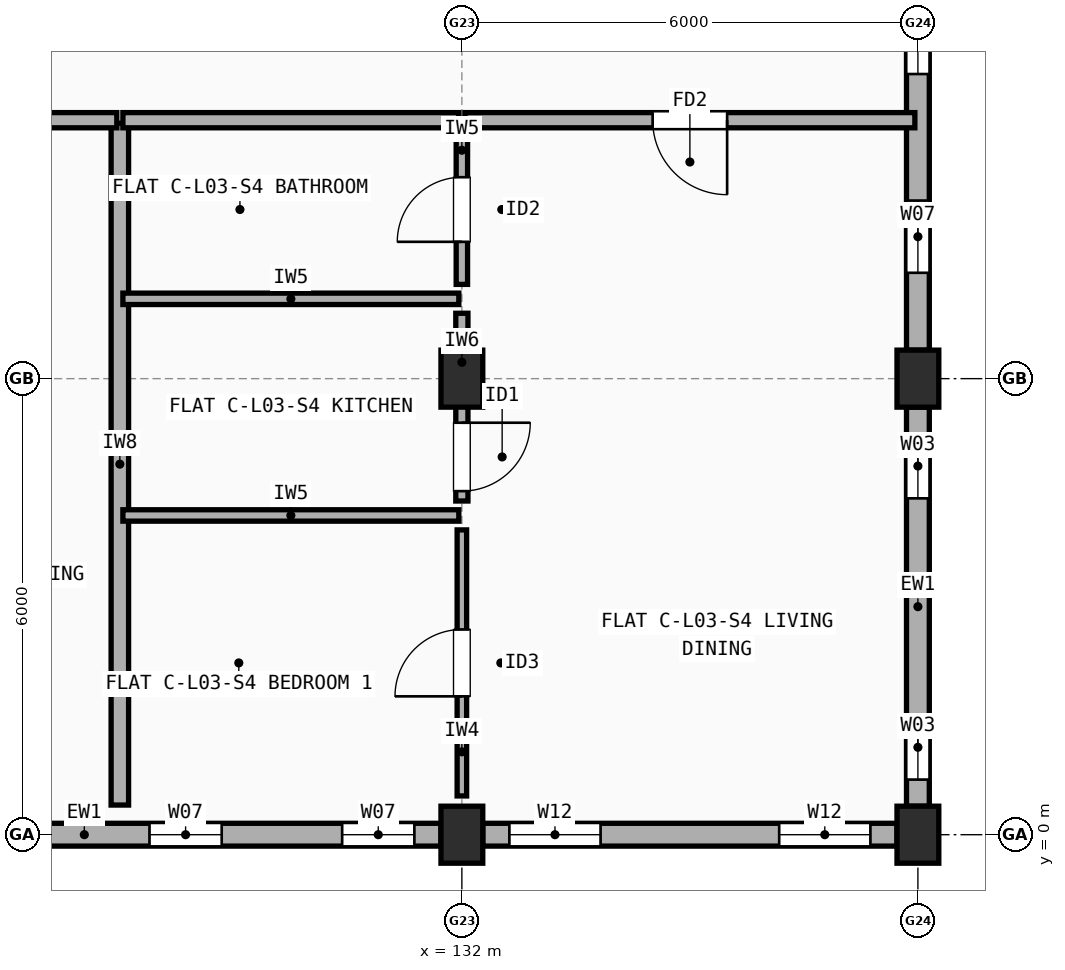
"""IFC4 building model, lengths in metres.
Left out: names, types, materials, properties, quantities, classifications, styles, units other than length and angle.
Written with IfcOpenShell. Run it as: python <this file> out.ifc"""

import sys

from ifc_helpers import new_model, si_unit, direction, frame, frame_2d, origin, origin_2d, place, context, subcontext, project, spatial, rectangle, extrude, element, fill, save


model = new_model("IFC4")
c1 = context("Model", 3, precision=1e-05, world=origin(), true_north=direction((0.0, 1.0)))
c2 = subcontext(c1, "Body", "Model", "MODEL_VIEW")
j1 = project(units=[si_unit("LENGTHUNIT", "METRE"), si_unit("PLANEANGLEUNIT", "RADIAN")], contexts=[c1])
p1 = place(None, origin())
s1 = spatial("IfcSite", under=j1, at=p1, CompositionType="ELEMENT")
p2 = place(p1, origin())
s2 = spatial("IfcBuilding", under=s1, at=p2, CompositionType="ELEMENT")
p3 = place(p2, frame((0.0, 0.0, 10.9)))
s3 = spatial("IfcBuildingStorey", under=s2, at=p3, CompositionType="ELEMENT", Elevation=10.9)
for number, where, z_axis, x_axis in (
    (1, (132.0, 0.0, 0.0), (0.0, 0.0, 1.0), (1.0, 0.0, 0.0)),
    (2, (132.0, 6.0, 0.0), (0.0, 0.0, 1.0), (1.0, 0.0, 0.0)),
    (3, (138.0, 0.0, 0.0), (0.0, 0.0, 1.0), (1.0, 0.0, 0.0)),
    (4, (138.0, 6.0, 0.0), (0.0, 0.0, 1.0), (1.0, 0.0, 0.0)),
):
    element("IfcColumn", number, at=place(p3, frame(where, z_axis=z_axis, x_axis=x_axis)), inside=s3, PredefinedType="COLUMN", context=c2, shape_type="SweptSolid", body=[
        extrude(rectangle(XDim=0.55, YDim=0.75, at=origin_2d()), origin(), (0.0, 0.0, 1.0), 2.96),
    ])
p4 = place(p3, frame((126.325, 0.0, 0.0), z_axis=(0.0, 0.0, 1.0), x_axis=(1.0, 0.0, 0.0)))
e5 = element("IfcWall", 5, at=p4, inside=s3, PredefinedType="STANDARD", context=c2, shape_type="SweptSolid", body=[
    extrude(rectangle(XDim=5.4, YDim=0.3, at=frame_2d((2.7, 0.0))), origin(), (0.0, 0.0, 1.0), 2.442),
])
p5 = place(p4, frame((1.565, 0.0, 0.9)))
e6 = element("IfcOpeningElement", 6, at=p5, cuts=e5, PredefinedType="OPENING", context=c2, shape_type="SweptSolid", body=[
    extrude(rectangle(XDim=0.95, YDim=1.35, at=frame_2d((0.475, 0.675))), frame((0.0, 0.16, 0.0), z_axis=(0.0, -1.0, 0.0), x_axis=(1.0, 0.0, 0.0)), (0.0, 0.0, 1.0), 0.32),
])
p6 = place(p4, frame((4.1, 0.0, 0.9)))
e7 = element("IfcOpeningElement", 7, at=p6, cuts=e5, PredefinedType="OPENING", context=c2, shape_type="SweptSolid", body=[
    extrude(rectangle(XDim=0.95, YDim=1.35, at=frame_2d((0.475, 0.675))), frame((0.0, 0.16, 0.0), z_axis=(0.0, -1.0, 0.0), x_axis=(1.0, 0.0, 0.0)), (0.0, 0.0, 1.0), 0.32),
])
p7 = place(p3, frame((132.275, 0.0, 0.0), z_axis=(0.0, 0.0, 1.0), x_axis=(1.0, 0.0, 0.0)))
e8 = element("IfcWall", 8, at=p7, inside=s3, PredefinedType="STANDARD", context=c2, shape_type="SweptSolid", body=[
    extrude(rectangle(XDim=5.45, YDim=0.3, at=frame_2d((2.725, 0.0))), origin(), (0.0, 0.0, 1.0), 2.442),
])
p8 = place(p7, frame((0.35, 0.0, 0.9)))
e9 = element("IfcOpeningElement", 9, at=p8, cuts=e8, PredefinedType="OPENING", context=c2, shape_type="SweptSolid", body=[
    extrude(rectangle(XDim=1.2, YDim=1.35, at=frame_2d((0.6, 0.675))), frame((0.0, 0.16, 0.0), z_axis=(0.0, -1.0, 0.0), x_axis=(1.0, 0.0, 0.0)), (0.0, 0.0, 1.0), 0.32),
])
p9 = place(p7, frame((3.9, 0.0, 0.9)))
e10 = element("IfcOpeningElement", 10, at=p9, cuts=e8, PredefinedType="OPENING", context=c2, shape_type="SweptSolid", body=[
    extrude(rectangle(XDim=1.2, YDim=1.35, at=frame_2d((0.6, 0.675))), frame((0.0, 0.16, 0.0), z_axis=(0.0, -1.0, 0.0), x_axis=(1.0, 0.0, 0.0)), (0.0, 0.0, 1.0), 0.32),
])
p10 = place(p3, frame((138.0, 0.375, 0.0), z_axis=(0.0, 0.0, 1.0), x_axis=(0.0, 1.0, 0.0)))
e11 = element("IfcWall", 11, at=p10, inside=s3, PredefinedType="STANDARD", context=c2, shape_type="SweptSolid", body=[
    extrude(rectangle(XDim=5.25, YDim=0.3, at=frame_2d((2.625, 0.0))), origin(), (0.0, 0.0, 1.0), 2.442),
])
p11 = place(p10, frame((0.35, 0.0, 0.9)))
e12 = element("IfcOpeningElement", 12, at=p11, cuts=e11, PredefinedType="OPENING", context=c2, shape_type="SweptSolid", body=[
    extrude(rectangle(XDim=0.85, YDim=1.25, at=frame_2d((0.425, 0.625))), frame((0.0, 0.16, 0.0), z_axis=(0.0, -1.0, 0.0), x_axis=(1.0, 0.0, 0.0)), (0.0, 0.0, 1.0), 0.32),
])
p12 = place(p10, frame((4.05, 0.0, 0.9)))
e13 = element("IfcOpeningElement", 13, at=p12, cuts=e11, PredefinedType="OPENING", context=c2, shape_type="SweptSolid", body=[
    extrude(rectangle(XDim=0.85, YDim=1.25, at=frame_2d((0.425, 0.625))), frame((0.0, 0.16, 0.0), z_axis=(0.0, -1.0, 0.0), x_axis=(1.0, 0.0, 0.0)), (0.0, 0.0, 1.0), 0.32),
])
p13 = place(p3, frame((138.0, 6.375, 0.0), z_axis=(0.0, 0.0, 1.0), x_axis=(0.0, 1.0, 0.0)))
e14 = element("IfcWall", 14, at=p13, inside=s3, PredefinedType="STANDARD", context=c2, shape_type="SweptSolid", body=[
    extrude(rectangle(XDim=5.25, YDim=0.3, at=frame_2d((2.625, 0.0))), origin(), (0.0, 0.0, 1.0), 2.442),
])
p14 = place(p13, frame((1.018, 0.0, 0.9)))
e15 = element("IfcOpeningElement", 15, at=p14, cuts=e14, PredefinedType="OPENING", context=c2, shape_type="SweptSolid", body=[
    extrude(rectangle(XDim=0.95, YDim=1.35, at=frame_2d((0.475, 0.675))), frame((0.0, 0.16, 0.0), z_axis=(0.0, -1.0, 0.0), x_axis=(1.0, 0.0, 0.0)), (0.0, 0.0, 1.0), 0.32),
])
p15 = place(p13, frame((3.633, 0.0, 0.9)))
e16 = element("IfcOpeningElement", 16, at=p15, cuts=e14, PredefinedType="OPENING", context=c2, shape_type="SweptSolid", body=[
    extrude(rectangle(XDim=1.05, YDim=1.35, at=frame_2d((0.525, 0.675))), frame((0.0, 0.16, 0.0), z_axis=(0.0, -1.0, 0.0), x_axis=(1.0, 0.0, 0.0)), (0.0, 0.0, 1.0), 0.32),
])
p16 = place(p3, frame((127.5, 0.39, 0.0), z_axis=(0.0, 0.0, 1.0), x_axis=(0.0, 1.0, 0.0)))
e17 = element("IfcWall", 17, at=p16, inside=s3, PredefinedType="SOLIDWALL", context=c2, shape_type="SweptSolid", body=[
    extrude(rectangle(XDim=8.97, YDim=0.23, at=frame_2d((4.485, 0.0))), origin(), (0.0, 0.0, 1.0), 2.442),
])
p17 = place(p3, frame((123.04, 9.4, 0.0), z_axis=(0.0, 0.0, 1.0), x_axis=(1.0, 0.0, 0.0)))
e18 = element("IfcWall", 18, at=p17, inside=s3, PredefinedType="SOLIDWALL", context=c2, shape_type="SweptSolid", body=[
    extrude(rectangle(XDim=4.42, YDim=0.2, at=frame_2d((2.21, 0.0))), origin(), (0.0, 0.0, 1.0), 2.548),
])
p18 = place(p17, frame((1.71, 0.0, 0.0)))
e19 = element("IfcOpeningElement", 19, at=p18, cuts=e18, PredefinedType="OPENING", context=c2, shape_type="SweptSolid", body=[
    extrude(rectangle(XDim=1.0, YDim=2.15, at=frame_2d((0.5, 1.075))), frame((0.0, 0.11, 0.0), z_axis=(0.0, -1.0, 0.0), x_axis=(1.0, 0.0, 0.0)), (0.0, 0.0, 1.0), 0.22),
])
p19 = place(p3, frame((127.54, 9.4, 0.0), z_axis=(0.0, 0.0, 1.0), x_axis=(1.0, 0.0, 0.0)))
e20 = element("IfcWall", 20, at=p19, inside=s3, PredefinedType="SOLIDWALL", context=c2, shape_type="SweptSolid", body=[
    extrude(rectangle(XDim=4.42, YDim=0.2, at=frame_2d((2.21, 0.0))), origin(), (0.0, 0.0, 1.0), 2.442),
])
p20 = place(p3, frame((132.04, 9.4, 0.0), z_axis=(0.0, 0.0, 1.0), x_axis=(1.0, 0.0, 0.0)))
e21 = element("IfcWall", 21, at=p20, inside=s3, PredefinedType="SOLIDWALL", context=c2, shape_type="SweptSolid", body=[
    extrude(rectangle(XDim=5.92, YDim=0.2, at=frame_2d((2.96, 0.0))), origin(), (0.0, 0.0, 1.0), 2.442),
])
p21 = place(p20, frame((2.47, 0.0, 0.0)))
e22 = element("IfcOpeningElement", 22, at=p21, cuts=e21, PredefinedType="OPENING", context=c2, shape_type="SweptSolid", body=[
    extrude(rectangle(XDim=0.98, YDim=2.15, at=frame_2d((0.49, 1.075))), frame((0.0, 0.11, 0.0), z_axis=(0.0, -1.0, 0.0), x_axis=(1.0, 0.0, 0.0)), (0.0, 0.0, 1.0), 0.22),
])
p22 = place(p3, frame((132.0, 0.51, 0.0), z_axis=(0.0, 0.0, 1.0), x_axis=(0.0, 1.0, 0.0)))
e23 = element("IfcWall", 23, at=p22, inside=s3, PredefinedType="PARTITIONING", context=c2, shape_type="SweptSolid", body=[
    extrude(rectangle(XDim=3.5, YDim=0.125, at=frame_2d((1.75, 0.0))), origin(), (0.0, 0.0, 1.0), 2.442),
])
p23 = place(p22, frame((1.31, 0.0, 0.0)))
e24 = element("IfcOpeningElement", 24, at=p23, cuts=e23, PredefinedType="OPENING", context=c2, shape_type="SweptSolid", body=[
    extrude(rectangle(XDim=0.88, YDim=2.1, at=frame_2d((0.44, 1.05))), frame((0.0, 0.073, 0.0), z_axis=(0.0, -1.0, 0.0), x_axis=(1.0, 0.0, 0.0)), (0.0, 0.0, 1.0), 0.145),
])
p24 = place(p3, frame((132.0, 4.39, 0.0), z_axis=(0.0, 0.0, 1.0), x_axis=(0.0, 1.0, 0.0)))
e25 = element("IfcWall", 25, at=p24, inside=s3, PredefinedType="PLUMBINGWALL", context=c2, shape_type="SweptSolid", body=[
    extrude(rectangle(XDim=2.47, YDim=0.16, at=frame_2d((1.235, 0.0))), origin(), (0.0, 0.0, 1.0), 2.442),
])
p25 = place(p24, frame((0.13, 0.0, 0.0)))
e26 = element("IfcOpeningElement", 26, at=p25, cuts=e25, PredefinedType="OPENING", context=c2, shape_type="SweptSolid", body=[
    extrude(rectangle(XDim=0.9, YDim=2.1, at=frame_2d((0.45, 1.05))), frame((0.0, 0.09, 0.0), z_axis=(0.0, -1.0, 0.0), x_axis=(1.0, 0.0, 0.0)), (0.0, 0.0, 1.0), 0.18),
])
p26 = place(p3, frame((132.0, 7.24, 0.0), z_axis=(0.0, 0.0, 1.0), x_axis=(0.0, 1.0, 0.0)))
e27 = element("IfcWall", 27, at=p26, inside=s3, PredefinedType="PARTITIONING", context=c2, shape_type="SweptSolid", body=[
    extrude(rectangle(XDim=1.97, YDim=0.15, at=frame_2d((0.985, 0.0))), origin(), (0.0, 0.0, 1.0), 2.442),
])
p27 = place(p26, frame((0.56, 0.0, 0.0)))
e28 = element("IfcOpeningElement", 28, at=p27, cuts=e27, PredefinedType="OPENING", context=c2, shape_type="SweptSolid", body=[
    extrude(rectangle(XDim=0.85, YDim=2.1, at=frame_2d((0.425, 1.05))), frame((0.0, 0.085, 0.0), z_axis=(0.0, -1.0, 0.0), x_axis=(1.0, 0.0, 0.0)), (0.0, 0.0, 1.0), 0.17),
])
for number, where, z_axis, x_axis in (
    (29, (127.54, 4.2, 0.0), (0.0, 0.0, 1.0), (1.0, 0.0, 0.0)),
    (30, (127.54, 7.05, 0.0), (0.0, 0.0, 1.0), (1.0, 0.0, 0.0)),
):
    element("IfcWall", number, at=place(p3, frame(where, z_axis=z_axis, x_axis=x_axis)), inside=s3, PredefinedType="PARTITIONING", context=c2, shape_type="SweptSolid", body=[
        extrude(rectangle(XDim=4.42, YDim=0.15, at=frame_2d((2.21, 0.0))), origin(), (0.0, 0.0, 1.0), 2.442),
    ])
p28 = place(p5, origin())
e31 = element("IfcWindow", 31, at=p28, inside=s3, PartitioningType="SINGLE_PANEL", PredefinedType="WINDOW", context=c2, shape_type="SweptSolid", body=[
    extrude(rectangle(XDim=0.95, YDim=1.35, at=frame_2d((0.475, 0.675))), frame((0.0, 0.03, 0.0), z_axis=(0.0, -1.0, 0.0), x_axis=(1.0, 0.0, 0.0)), (0.0, 0.0, 1.0), 0.06),
])
fill(e6, e31)
p29 = place(p6, origin())
e32 = element("IfcWindow", 32, at=p29, inside=s3, PartitioningType="SINGLE_PANEL", PredefinedType="WINDOW", context=c2, shape_type="SweptSolid", body=[
    extrude(rectangle(XDim=0.95, YDim=1.35, at=frame_2d((0.475, 0.675))), frame((0.0, 0.03, 0.0), z_axis=(0.0, -1.0, 0.0), x_axis=(1.0, 0.0, 0.0)), (0.0, 0.0, 1.0), 0.06),
])
fill(e7, e32)
p30 = place(p8, origin())
e33 = element("IfcWindow", 33, at=p30, inside=s3, PartitioningType="SINGLE_PANEL", PredefinedType="WINDOW", context=c2, shape_type="SweptSolid", body=[
    extrude(rectangle(XDim=1.2, YDim=1.35, at=frame_2d((0.6, 0.675))), frame((0.0, 0.03, 0.0), z_axis=(0.0, -1.0, 0.0), x_axis=(1.0, 0.0, 0.0)), (0.0, 0.0, 1.0), 0.06),
])
fill(e9, e33)
p31 = place(p9, origin())
e34 = element("IfcWindow", 34, at=p31, inside=s3, PartitioningType="SINGLE_PANEL", PredefinedType="WINDOW", context=c2, shape_type="SweptSolid", body=[
    extrude(rectangle(XDim=1.2, YDim=1.35, at=frame_2d((0.6, 0.675))), frame((0.0, 0.03, 0.0), z_axis=(0.0, -1.0, 0.0), x_axis=(1.0, 0.0, 0.0)), (0.0, 0.0, 1.0), 0.06),
])
fill(e10, e34)
p32 = place(p11, origin())
e35 = element("IfcWindow", 35, at=p32, inside=s3, PartitioningType="SINGLE_PANEL", PredefinedType="WINDOW", context=c2, shape_type="SweptSolid", body=[
    extrude(rectangle(XDim=0.85, YDim=1.25, at=frame_2d((0.425, 0.625))), frame((0.0, 0.03, 0.0), z_axis=(0.0, -1.0, 0.0), x_axis=(1.0, 0.0, 0.0)), (0.0, 0.0, 1.0), 0.06),
])
fill(e12, e35)
p33 = place(p12, origin())
e36 = element("IfcWindow", 36, at=p33, inside=s3, PartitioningType="SINGLE_PANEL", PredefinedType="WINDOW", context=c2, shape_type="SweptSolid", body=[
    extrude(rectangle(XDim=0.85, YDim=1.25, at=frame_2d((0.425, 0.625))), frame((0.0, 0.03, 0.0), z_axis=(0.0, -1.0, 0.0), x_axis=(1.0, 0.0, 0.0)), (0.0, 0.0, 1.0), 0.06),
])
fill(e13, e36)
p34 = place(p14, origin())
e37 = element("IfcWindow", 37, at=p34, inside=s3, PartitioningType="SINGLE_PANEL", PredefinedType="WINDOW", context=c2, shape_type="SweptSolid", body=[
    extrude(rectangle(XDim=0.95, YDim=1.35, at=frame_2d((0.475, 0.675))), frame((0.0, 0.03, 0.0), z_axis=(0.0, -1.0, 0.0), x_axis=(1.0, 0.0, 0.0)), (0.0, 0.0, 1.0), 0.06),
])
fill(e15, e37)
p35 = place(p15, origin())
e38 = element("IfcWindow", 38, at=p35, inside=s3, PartitioningType="SINGLE_PANEL", PredefinedType="WINDOW", context=c2, shape_type="SweptSolid", body=[
    extrude(rectangle(XDim=1.05, YDim=1.35, at=frame_2d((0.525, 0.675))), frame((0.0, 0.03, 0.0), z_axis=(0.0, -1.0, 0.0), x_axis=(1.0, 0.0, 0.0)), (0.0, 0.0, 1.0), 0.06),
])
fill(e16, e38)
p36 = place(p21, origin())
e39 = element("IfcDoor", 39, at=p36, inside=s3, OperationType="SINGLE_SWING_RIGHT", PredefinedType="DOOR", context=c2, shape_type="SweptSolid", body=[
    extrude(rectangle(XDim=0.98, YDim=2.15, at=frame_2d((0.49, 1.075))), frame((0.0, 0.025, 0.0), z_axis=(0.0, -1.0, 0.0), x_axis=(1.0, 0.0, 0.0)), (0.0, 0.0, 1.0), 0.05),
])
fill(e22, e39)
p37 = place(p23, origin())
e40 = element("IfcDoor", 40, at=p37, inside=s3, OperationType="SINGLE_SWING_LEFT", PredefinedType="DOOR", context=c2, shape_type="SweptSolid", body=[
    extrude(rectangle(XDim=0.88, YDim=2.1, at=frame_2d((0.44, 1.05))), frame((0.0, 0.025, 0.0), z_axis=(0.0, -1.0, 0.0), x_axis=(1.0, 0.0, 0.0)), (0.0, 0.0, 1.0), 0.05),
])
fill(e24, e40)
p38 = place(p25, origin())
e41 = element("IfcDoor", 41, at=p38, inside=s3, OperationType="SINGLE_SWING_RIGHT", PredefinedType="DOOR", context=c2, shape_type="SweptSolid", body=[
    extrude(rectangle(XDim=0.9, YDim=2.1, at=frame_2d((0.45, 1.05))), frame((0.0, 0.025, 0.0), z_axis=(0.0, -1.0, 0.0), x_axis=(1.0, 0.0, 0.0)), (0.0, 0.0, 1.0), 0.05),
])
fill(e26, e41)
p39 = place(p27, origin())
e42 = element("IfcDoor", 42, at=p39, inside=s3, OperationType="SINGLE_SWING_LEFT", PredefinedType="DOOR", context=c2, shape_type="SweptSolid", body=[
    extrude(rectangle(XDim=0.85, YDim=2.1, at=frame_2d((0.425, 1.05))), frame((0.0, 0.025, 0.0), z_axis=(0.0, -1.0, 0.0), x_axis=(1.0, 0.0, 0.0)), (0.0, 0.0, 1.0), 0.05),
])
fill(e28, e42)
save(model, sys.argv[1])
